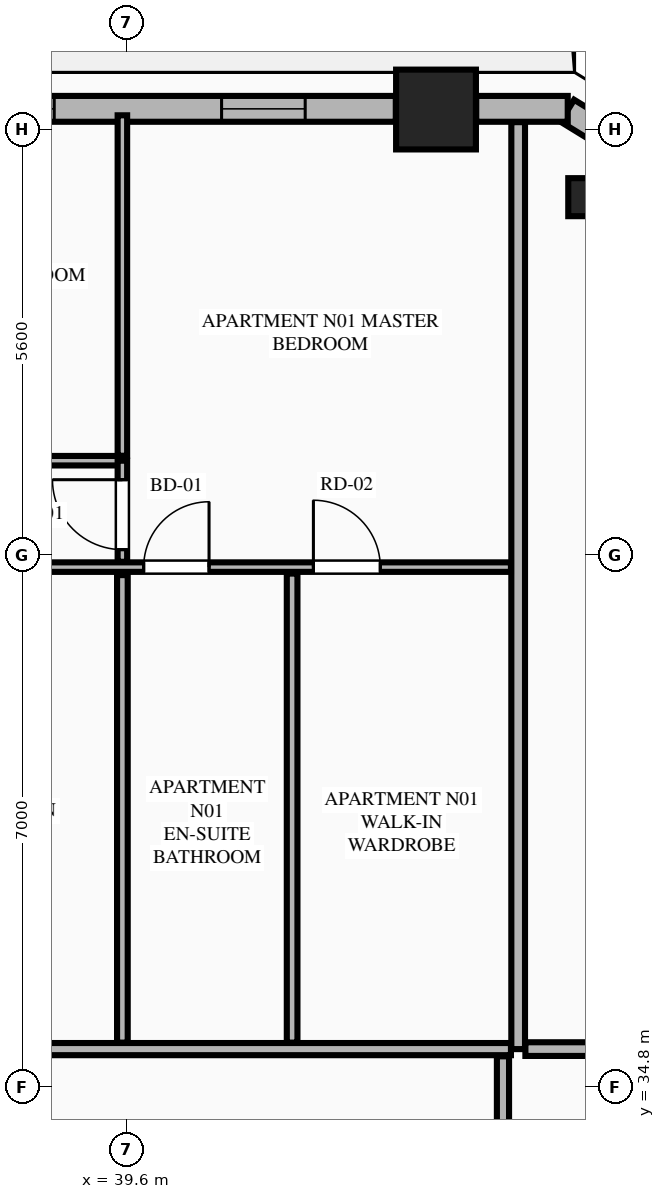
"""IFC4 building model, lengths in metres.
Left out: names, types, materials, properties, quantities, classifications, styles, units other than length and angle.
Written with IfcOpenShell. Run it as: python <this file> out.ifc"""

import sys

from ifc_helpers import new_model, si_unit, direction, frame, frame_2d, origin, origin_2d, place, context, subcontext, project, spatial, rectangle, extrude, element, fill, save


model = new_model("IFC4")
c1 = context("Model", 3, precision=1e-05, world=origin(), true_north=direction((0.0, 1.0)))
c2 = subcontext(c1, "Body", "Model", "MODEL_VIEW")
j1 = project(units=[si_unit("LENGTHUNIT", "METRE"), si_unit("PLANEANGLEUNIT", "RADIAN")], contexts=[c1])
p1 = place(None, origin())
s1 = spatial("IfcSite", under=j1, at=p1, CompositionType="ELEMENT")
p2 = place(p1, origin())
s2 = spatial("IfcBuilding", under=s1, at=p2, CompositionType="ELEMENT")
p3 = place(p2, frame((0.0, 0.0, 141.0)))
s3 = spatial("IfcBuildingStorey", under=s2, at=p3, CompositionType="ELEMENT", Elevation=141.0)
p4 = place(p3, frame((43.669, 47.661, 0.0), z_axis=(0.0, 0.0, 1.0), x_axis=(1.0, 0.0, 0.0)))
e1 = element("IfcColumn", 1, at=p4, inside=s3, PredefinedType="COLUMN", context=c2, shape_type="SweptSolid", body=[
    extrude(rectangle(XDim=1.05, YDim=1.05, at=origin_2d()), origin(), (0.0, 0.0, 1.0), 3.55),
])
p5 = place(p3, frame((45.659, 46.508, 0.0), z_axis=(0.0, 0.0, 1.0), x_axis=(-0.865160173452, 0.501495637342, 0.0)))
e2 = element("IfcColumn", 2, at=p5, inside=s3, PredefinedType="PILASTER", context=c2, shape_type="SweptSolid", body=[
    extrude(rectangle(XDim=0.5, YDim=0.35, at=origin_2d()), origin(), (0.0, 0.0, 1.0), 3.55),
])
p6 = place(p3, frame((46.971, 46.677, 0.0), z_axis=(0.0, 0.0, 1.0), x_axis=(-0.851798915137, 0.523868884523, 0.0)))
e3 = element("IfcWall", 3, at=p6, inside=s3, PredefinedType="STANDARD", context=c2, shape_type="SweptSolid", body=[
    extrude(rectangle(XDim=1.848, YDim=0.34, at=frame_2d((0.924, 0.0))), origin(), (0.0, 0.0, 1.0), 3.34),
])
p7 = place(p3, frame((45.402, 47.67, 0.0), z_axis=(0.0, 0.0, 1.0), x_axis=(-1.0, 0.0, 0.0)))
e4 = element("IfcWall", 4, at=p7, inside=s3, PredefinedType="STANDARD", context=c2, shape_type="SweptSolid", body=[
    extrude(rectangle(XDim=1.204, YDim=0.34, at=frame_2d((0.602, 0.0))), origin(), (0.0, 0.0, 1.0), 3.34),
])
p8 = place(p3, frame((43.14, 47.67, 0.0), z_axis=(0.0, 0.0, 1.0), x_axis=(-1.0, 0.0, 0.0)))
e5 = element("IfcWall", 5, at=p8, inside=s3, PredefinedType="STANDARD", context=c2, shape_type="SweptSolid", body=[
    extrude(rectangle(XDim=6.379, YDim=0.34, at=frame_2d((3.189, 0.0))), origin(), (0.0, 0.0, 1.0), 2.797),
])
p9 = place(p8, frame((1.192, 0.0, 0.75)))
e6 = element("IfcOpeningElement", 6, at=p9, cuts=e5, PredefinedType="OPENING", context=c2, shape_type="SweptSolid", body=[
    extrude(rectangle(XDim=1.1, YDim=1.897, at=frame_2d((0.55, 0.948))), frame((0.0, 0.18, 0.0), z_axis=(0.0, -1.0, 0.0), x_axis=(1.0, 0.0, 0.0)), (0.0, 0.0, 1.0), 0.36),
])
p10 = place(p8, frame((4.494, 0.0, 0.75)))
e7 = element("IfcOpeningElement", 7, at=p10, cuts=e5, PredefinedType="OPENING", context=c2, shape_type="SweptSolid", body=[
    extrude(rectangle(XDim=1.1, YDim=1.897, at=frame_2d((0.55, 0.948))), frame((0.0, 0.18, 0.0), z_axis=(0.0, -1.0, 0.0), x_axis=(1.0, 0.0, 0.0)), (0.0, 0.0, 1.0), 0.36),
])
p11 = place(p3, frame((44.75, 35.3, 0.0), z_axis=(0.0, 0.0, 1.0), x_axis=(0.0, 1.0, 0.0)))
e8 = element("IfcWall", 8, at=p11, inside=s3, PredefinedType="PARTITIONING", context=c2, shape_type="SweptSolid", body=[
    extrude(rectangle(XDim=12.195, YDim=0.18, at=frame_2d((6.098, 0.0))), origin(), (0.0, 0.0, 1.0), 3.34),
])
p12 = place(p3, frame((20.145, 35.3, 0.0), z_axis=(0.0, 0.0, 1.0), x_axis=(1.0, 0.0, 0.0)))
e9 = element("IfcWall", 9, at=p12, inside=s3, PredefinedType="PARTITIONING", context=c2, shape_type="SweptSolid", body=[
    extrude(rectangle(XDim=24.51, YDim=0.16, at=frame_2d((12.255, 0.0))), origin(), (0.0, 0.0, 1.0), 3.34),
])
p13 = place(p12, frame((0.405, 0.0, 0.0)))
e10 = element("IfcOpeningElement", 10, at=p13, cuts=e9, PredefinedType="OPENING", context=c2, shape_type="SweptSolid", body=[
    extrude(rectangle(XDim=1.35, YDim=2.35, at=frame_2d((0.675, 1.175))), frame((0.0, 0.09, 0.0), z_axis=(0.0, -1.0, 0.0), x_axis=(1.0, 0.0, 0.0)), (0.0, 0.0, 1.0), 0.18),
])
p14 = place(p3, frame((34.643, 41.641, 0.0), z_axis=(0.0, 0.0, 1.0), x_axis=(1.0, 0.0, 0.0)))
e11 = element("IfcWall", 11, at=p14, inside=s3, PredefinedType="PARTITIONING", context=c2, shape_type="SweptSolid", body=[
    extrude(rectangle(XDim=10.012, YDim=0.125, at=frame_2d((5.006, 0.0))), origin(), (0.0, 0.0, 1.0), 3.34),
])
p15 = place(p14, frame((5.18, 0.0, 0.0)))
e12 = element("IfcOpeningElement", 12, at=p15, cuts=e11, PredefinedType="OPENING", context=c2, shape_type="SweptSolid", body=[
    extrude(rectangle(XDim=0.86, YDim=2.1, at=frame_2d((0.43, 1.05))), frame((0.0, 0.073, 0.0), z_axis=(0.0, -1.0, 0.0), x_axis=(1.0, 0.0, 0.0)), (0.0, 0.0, 1.0), 0.145),
])
p16 = place(p14, frame((7.413, 0.0, 0.0)))
e13 = element("IfcOpeningElement", 13, at=p16, cuts=e11, PredefinedType="OPENING", context=c2, shape_type="SweptSolid", body=[
    extrude(rectangle(XDim=0.88, YDim=2.15, at=frame_2d((0.44, 1.075))), frame((0.0, 0.073, 0.0), z_axis=(0.0, -1.0, 0.0), x_axis=(1.0, 0.0, 0.0)), (0.0, 0.0, 1.0), 0.145),
])
p17 = place(p14, frame((0.3, 0.0, 0.0)))
e14 = element("IfcOpeningElement", 14, at=p17, cuts=e11, PredefinedType="OPENING", context=c2, shape_type="SweptSolid", body=[
    extrude(rectangle(XDim=0.88, YDim=2.15, at=frame_2d((0.44, 1.075))), frame((0.0, 0.073, 0.0), z_axis=(0.0, -1.0, 0.0), x_axis=(1.0, 0.0, 0.0)), (0.0, 0.0, 1.0), 0.145),
])
p18 = place(p3, frame((29.436, 43.041, 0.0), z_axis=(0.0, 0.0, 1.0), x_axis=(1.0, 0.0, 0.0)))
e15 = element("IfcWall", 15, at=p18, inside=s3, PredefinedType="PARTITIONING", context=c2, shape_type="SweptSolid", body=[
    extrude(rectangle(XDim=10.107, YDim=0.125, at=frame_2d((5.053, 0.0))), origin(), (0.0, 0.0, 1.0), 3.34),
])
p19 = place(p18, frame((0.35, 0.0, 0.0)))
e16 = element("IfcOpeningElement", 16, at=p19, cuts=e15, PredefinedType="OPENING", context=c2, shape_type="SweptSolid", body=[
    extrude(rectangle(XDim=0.92, YDim=2.15, at=frame_2d((0.46, 1.075))), frame((0.0, 0.073, 0.0), z_axis=(0.0, -1.0, 0.0), x_axis=(1.0, 0.0, 0.0)), (0.0, 0.0, 1.0), 0.145),
])
p20 = place(p18, frame((5.557, 0.0, 0.0)))
e17 = element("IfcOpeningElement", 17, at=p20, cuts=e15, PredefinedType="OPENING", context=c2, shape_type="SweptSolid", body=[
    extrude(rectangle(XDim=0.92, YDim=2.15, at=frame_2d((0.46, 1.075))), frame((0.0, 0.073, 0.0), z_axis=(0.0, -1.0, 0.0), x_axis=(1.0, 0.0, 0.0)), (0.0, 0.0, 1.0), 0.145),
])
p21 = place(p3, frame((39.543, 41.711, 0.0), z_axis=(0.0, 0.0, 1.0), x_axis=(0.0, 1.0, 0.0)))
e18 = element("IfcWall", 18, at=p21, inside=s3, PredefinedType="PARTITIONING", context=c2, shape_type="SweptSolid", body=[
    extrude(rectangle(XDim=1.33, YDim=0.125, at=frame_2d((0.665, 0.0))), origin(), (0.0, 0.0, 1.0), 3.34),
])
p22 = place(p21, frame((0.16, 0.0, 0.0)))
e19 = element("IfcOpeningElement", 19, at=p22, cuts=e18, PredefinedType="OPENING", context=c2, shape_type="SweptSolid", body=[
    extrude(rectangle(XDim=0.92, YDim=2.15, at=frame_2d((0.46, 1.075))), frame((0.0, 0.073, 0.0), z_axis=(0.0, -1.0, 0.0), x_axis=(1.0, 0.0, 0.0)), (0.0, 0.0, 1.0), 0.145),
])
p23 = place(p3, frame((39.543, 43.106, 0.0), z_axis=(0.0, 0.0, 1.0), x_axis=(0.0, 1.0, 0.0)))
e20 = element("IfcWall", 20, at=p23, inside=s3, PredefinedType="PARTITIONING", context=c2, shape_type="SweptSolid", body=[
    extrude(rectangle(XDim=4.479, YDim=0.125, at=frame_2d((2.24, 0.0))), origin(), (0.0, 0.0, 1.0), 3.34),
])
p24 = place(p3, frame((39.543, 35.385, 0.0), z_axis=(0.0, 0.0, 1.0), x_axis=(0.0, 1.0, 0.0)))
e21 = element("IfcWall", 21, at=p24, inside=s3, PredefinedType="PLUMBINGWALL", context=c2, shape_type="SweptSolid", body=[
    extrude(rectangle(XDim=6.151, YDim=0.14, at=frame_2d((3.075, 0.0))), origin(), (0.0, 0.0, 1.0), 3.34),
])
p25 = place(p3, frame((41.776, 35.385, 0.0), z_axis=(0.0, 0.0, 1.0), x_axis=(0.0, 1.0, 0.0)))
e22 = element("IfcWall", 22, at=p25, inside=s3, PredefinedType="PLUMBINGWALL", context=c2, shape_type="SweptSolid", body=[
    extrude(rectangle(XDim=6.171, YDim=0.14, at=frame_2d((3.085, 0.0))), origin(), (0.0, 0.0, 1.0), 2.722),
])
p26 = place(p3, frame((44.845, 35.3, 0.0), z_axis=(0.0, 0.0, 1.0), x_axis=(1.0, 0.0, 0.0)))
e23 = element("IfcWall", 23, at=p26, inside=s3, PredefinedType="PARTITIONING", context=c2, shape_type="SweptSolid", body=[
    extrude(rectangle(XDim=7.669, YDim=0.18, at=frame_2d((3.834, 0.0))), origin(), (0.0, 0.0, 1.0), 3.34),
])
p27 = place(p3, frame((44.55, 27.499, 0.0), z_axis=(0.0, 0.0, 1.0), x_axis=(0.0, 1.0, 0.0)))
e24 = element("IfcWall", 24, at=p27, inside=s3, PredefinedType="PARTITIONING", context=c2, shape_type="SweptSolid", body=[
    extrude(rectangle(XDim=7.706, YDim=0.16, at=frame_2d((3.853, 0.0))), origin(), (0.0, 0.0, 1.0), 3.34),
])
p28 = place(p27, frame((0.4, 0.0, 0.0)))
e25 = element("IfcOpeningElement", 25, at=p28, cuts=e24, PredefinedType="OPENING", context=c2, shape_type="SweptSolid", body=[
    extrude(rectangle(XDim=1.02, YDim=2.25, at=frame_2d((0.51, 1.125))), frame((0.0, 0.09, 0.0), z_axis=(0.0, -1.0, 0.0), x_axis=(1.0, 0.0, 0.0)), (0.0, 0.0, 1.0), 0.18),
])
p29 = place(p9, origin())
e26 = element("IfcWindow", 26, at=p29, inside=s3, PartitioningType="SINGLE_PANEL", PredefinedType="WINDOW", context=c2, shape_type="SweptSolid", body=[
    extrude(rectangle(XDim=1.1, YDim=1.897, at=frame_2d((0.55, 0.948))), frame((0.0, 0.03, 0.0), z_axis=(0.0, -1.0, 0.0), x_axis=(1.0, 0.0, 0.0)), (0.0, 0.0, 1.0), 0.06),
])
fill(e6, e26)
p30 = place(p15, origin())
e27 = element("IfcDoor", 27, at=p30, inside=s3, OperationType="SINGLE_SWING_RIGHT", PredefinedType="DOOR", context=c2, shape_type="SweptSolid", body=[
    extrude(rectangle(XDim=0.86, YDim=2.1, at=frame_2d((0.43, 1.05))), frame((0.0, 0.025, 0.0), z_axis=(0.0, -1.0, 0.0), x_axis=(1.0, 0.0, 0.0)), (0.0, 0.0, 1.0), 0.05),
])
fill(e12, e27)
p31 = place(p16, origin())
e28 = element("IfcDoor", 28, at=p31, inside=s3, OperationType="SINGLE_SWING_LEFT", PredefinedType="DOOR", context=c2, shape_type="SweptSolid", body=[
    extrude(rectangle(XDim=0.88, YDim=2.15, at=frame_2d((0.44, 1.075))), frame((0.0, 0.025, 0.0), z_axis=(0.0, -1.0, 0.0), x_axis=(1.0, 0.0, 0.0)), (0.0, 0.0, 1.0), 0.05),
])
fill(e13, e28)
p32 = place(p22, origin())
e29 = element("IfcDoor", 29, at=p32, inside=s3, OperationType="SINGLE_SWING_RIGHT", PredefinedType="DOOR", context=c2, shape_type="SweptSolid", body=[
    extrude(rectangle(XDim=0.92, YDim=2.15, at=frame_2d((0.46, 1.075))), frame((0.0, 0.025, 0.0), z_axis=(0.0, -1.0, 0.0), x_axis=(1.0, 0.0, 0.0)), (0.0, 0.0, 1.0), 0.05),
])
fill(e19, e29)
p33 = place(p10, origin())
e30 = element("IfcWindow", 30, at=p33, inside=s3, PartitioningType="SINGLE_PANEL", PredefinedType="WINDOW", context=c2, shape_type="SweptSolid", body=[
    extrude(rectangle(XDim=1.1, YDim=1.897, at=frame_2d((0.55, 0.948))), frame((0.0, 0.03, 0.0), z_axis=(0.0, -1.0, 0.0), x_axis=(1.0, 0.0, 0.0)), (0.0, 0.0, 1.0), 0.06),
])
fill(e7, e30)
save(model, sys.argv[1])
